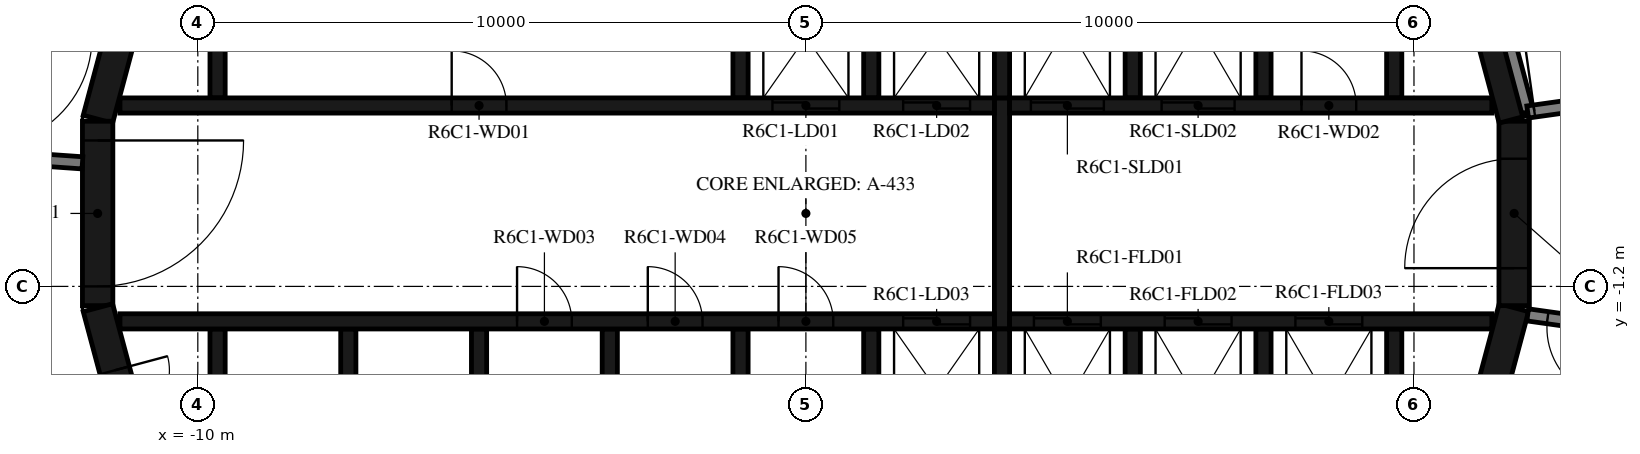
"""IFC4 building model, lengths in metres.
Left out: names, types, materials, properties, quantities, classifications, styles, units other than length and angle.
Written with IfcOpenShell. Run it as: python <this file> out.ifc"""

import sys

from ifc_helpers import new_model, si_unit, direction, frame, frame_2d, origin, place, context, subcontext, project, spatial, polyline, rectangle, outline, extrude, element, fill, save


model = new_model("IFC4")
c1 = context("Model", 3, precision=1e-05, world=origin(), true_north=direction((0.0, 1.0)))
c2 = subcontext(c1, "Body", "Model", "MODEL_VIEW")
j1 = project(units=[si_unit("LENGTHUNIT", "METRE"), si_unit("PLANEANGLEUNIT", "RADIAN")], contexts=[c1])
p1 = place(None, origin())
s1 = spatial("IfcSite", under=j1, at=p1, CompositionType="ELEMENT")
p2 = place(p1, origin())
s2 = spatial("IfcBuilding", under=s1, at=p2, CompositionType="ELEMENT")
p3 = place(p2, frame((0.0, 0.0, 251.2)))
s3 = spatial("IfcBuildingStorey", under=s2, at=p3, CompositionType="ELEMENT", Elevation=251.2)
p4 = place(p3, frame((10.858, -4.479, 0.0), z_axis=(0.0, 0.0, 1.0), x_axis=(0.258734743916, 0.965948410781, 0.0)))
e1 = element("IfcWall", 1, at=p4, inside=s3, PredefinedType="SHEAR", context=c2, shape_type="SweptSolid", body=[
    extrude(rectangle(XDim=3.033, YDim=0.5, at=frame_2d((1.516, 0.0))), origin(), (0.0, 0.0, 1.0), 3.12),
])
p5 = place(p3, frame((11.647, -1.516, 0.0), z_axis=(0.0, 0.0, 1.0), x_axis=(0.0, 1.0, 0.0)))
e2 = element("IfcWall", 2, at=p5, inside=s3, PredefinedType="SHEAR", context=c2, shape_type="SweptSolid", body=[
    extrude(rectangle(XDim=3.033, YDim=0.5, at=frame_2d((1.516, 0.0))), origin(), (0.0, 0.0, 1.0), 3.12),
])
p6 = place(p5, frame((0.616, 0.0, 0.0)))
e3 = element("IfcOpeningElement", 3, at=p6, cuts=e2, PredefinedType="OPENING", context=c2, shape_type="SweptSolid", body=[
    extrude(rectangle(XDim=1.8, YDim=2.1, at=frame_2d((0.9, 1.05))), frame((0.0, 0.26, 0.0), z_axis=(0.0, -1.0, 0.0), x_axis=(1.0, 0.0, 0.0)), (0.0, 0.0, 1.0), 0.52),
])
for number, where, z_axis, x_axis in (
    (4, (11.643, 1.55, 0.0), (0.0, 0.0, 1.0), (-0.259, 0.966, 0.0)),
    (5, (-10.858, 4.479, 0.0), (0.0, 0.0, 1.0), (-0.259, -0.966, 0.0)),
):
    element("IfcWall", number, at=place(p3, frame(where, z_axis=z_axis, x_axis=x_axis)), inside=s3, PredefinedType="SHEAR", context=c2, shape_type="SweptSolid", body=[
        extrude(rectangle(XDim=3.033, YDim=0.5, at=frame_2d((1.516, 0.0))), origin(), (0.0, 0.0, 1.0), 3.12),
    ])
p7 = place(p3, frame((-11.647, 1.516, 0.0), z_axis=(0.0, 0.0, 1.0), x_axis=(0.0, -1.0, 0.0)))
e6 = element("IfcWall", 6, at=p7, inside=s3, PredefinedType="SHEAR", context=c2, shape_type="SweptSolid", body=[
    extrude(rectangle(XDim=3.033, YDim=0.5, at=frame_2d((1.516, 0.0))), origin(), (0.0, 0.0, 1.0), 3.12),
])
p8 = place(p7, frame((0.316, 0.0, 0.0)))
e7 = element("IfcOpeningElement", 7, at=p8, cuts=e6, PredefinedType="OPENING", context=c2, shape_type="SweptSolid", body=[
    extrude(rectangle(XDim=2.4, YDim=2.1, at=frame_2d((1.2, 1.05))), frame((0.0, 0.26, 0.0), z_axis=(0.0, -1.0, 0.0), x_axis=(1.0, 0.0, 0.0)), (0.0, 0.0, 1.0), 0.52),
])
p9 = place(p3, frame((-11.643, -1.55, 0.0), z_axis=(0.0, 0.0, 1.0), x_axis=(0.258734743916, -0.965948410781, 0.0)))
e8 = element("IfcWall", 8, at=p9, inside=s3, PredefinedType="SHEAR", context=c2, shape_type="SweptSolid", body=[
    extrude(rectangle(XDim=3.033, YDim=0.5, at=frame_2d((1.516, 0.0))), origin(), (0.0, 0.0, 1.0), 3.12),
])
p10 = place(p9, frame((1.066, 0.0, 0.0)))
e9 = element("IfcOpeningElement", 9, at=p10, cuts=e8, PredefinedType="OPENING", context=c2, shape_type="SweptSolid", body=[
    extrude(rectangle(XDim=0.9, YDim=2.1, at=frame_2d((0.45, 1.05))), frame((0.0, 0.26, 0.0), z_axis=(0.0, -1.0, 0.0), x_axis=(1.0, 0.0, 0.0)), (0.0, 0.0, 1.0), 0.52),
])
p11 = place(p3, origin())
e10 = element("IfcWall", 10, at=p11, inside=s3, PredefinedType="SHEAR", context=c2, shape_type="SweptSolid", body=[
    extrude(outline(polyline([(-9.55, 4.8), (-1.2, 4.8), (-1.2, 1.9), (-0.95, 1.9), (-0.95, 4.8), (0.95, 4.8), (0.95, 1.9), (1.2, 1.9), (1.2, 4.8), (3.1, 4.8), (3.1, 1.9), (3.35, 1.9), (3.35, 4.8), (5.25, 4.8), (5.25, 1.9), (5.5, 1.9), (5.5, 4.8), (7.4, 4.8), (7.4, 1.9), (7.65, 1.9), (7.65, 4.8), (9.55, 4.8), (9.55, 1.9), (9.8, 1.9), (9.8, 4.8), (9.8, 5.05), (-9.8, 5.05), (-9.8, 4.8), (-9.8, 1.9), (-9.55, 1.9), (-9.55, 4.8)])), origin(), (0.0, 0.0, 1.0), 3.12),
])
p12 = place(p3, origin())
e11 = element("IfcWall", 11, at=p12, inside=s3, PredefinedType="SHEAR", context=c2, shape_type="SweptSolid", body=[
    extrude(outline(polyline([(9.8, -5.05), (9.8, -4.8), (9.8, -1.9), (9.55, -1.9), (9.55, -4.8), (7.65, -4.8), (7.65, -1.9), (7.4, -1.9), (7.4, -4.8), (5.5, -4.8), (5.5, -1.9), (5.25, -1.9), (5.25, -4.8), (3.35, -4.8), (3.35, -1.9), (3.1, -1.9), (3.1, -4.8), (1.2, -4.8), (1.2, -1.9), (0.95, -1.9), (0.95, -4.8), (-0.95, -4.8), (-0.95, -1.9), (-1.2, -1.9), (-1.2, -4.8), (-3.1, -4.8), (-3.1, -1.9), (-3.35, -1.9), (-3.35, -4.8), (-5.25, -4.8), (-5.25, -1.9), (-5.5, -1.9), (-5.5, -4.8), (-7.4, -4.8), (-7.4, -1.9), (-7.65, -1.9), (-7.65, -4.8), (-9.55, -4.8), (-9.55, -1.9), (-9.8, -1.9), (-9.8, -4.8), (-9.8, -5.05), (9.8, -5.05)])), origin(), (0.0, 0.0, 1.0), 3.12),
])
p13 = place(p3, frame((-11.28, 1.775, 0.0), z_axis=(0.0, 0.0, 1.0), x_axis=(1.0, 0.0, 0.0)))
e12 = element("IfcWall", 12, at=p13, inside=s3, PredefinedType="SHEAR", context=c2, shape_type="SweptSolid", body=[
    extrude(rectangle(XDim=14.38, YDim=0.25, at=frame_2d((7.19, 0.0))), origin(), (0.0, 0.0, 1.0), 3.12),
])
p14 = place(p13, frame((10.73, 0.0, 0.0)))
e13 = element("IfcOpeningElement", 13, at=p14, cuts=e12, PredefinedType="OPENING", context=c2, shape_type="SweptSolid", body=[
    extrude(rectangle(XDim=1.1, YDim=2.1, at=frame_2d((0.55, 1.05))), frame((0.0, 0.135, 0.0), z_axis=(0.0, -1.0, 0.0), x_axis=(1.0, 0.0, 0.0)), (0.0, 0.0, 1.0), 0.27),
])
p15 = place(p13, frame((12.88, 0.0, 0.0)))
e14 = element("IfcOpeningElement", 14, at=p15, cuts=e12, PredefinedType="OPENING", context=c2, shape_type="SweptSolid", body=[
    extrude(rectangle(XDim=1.1, YDim=2.1, at=frame_2d((0.55, 1.05))), frame((0.0, 0.135, 0.0), z_axis=(0.0, -1.0, 0.0), x_axis=(1.0, 0.0, 0.0)), (0.0, 0.0, 1.0), 0.27),
])
p16 = place(p13, frame((5.455, 0.0, 0.0)))
e15 = element("IfcOpeningElement", 15, at=p16, cuts=e12, PredefinedType="OPENING", context=c2, shape_type="SweptSolid", body=[
    extrude(rectangle(XDim=0.9, YDim=2.1, at=frame_2d((0.45, 1.05))), frame((0.0, 0.135, 0.0), z_axis=(0.0, -1.0, 0.0), x_axis=(1.0, 0.0, 0.0)), (0.0, 0.0, 1.0), 0.27),
])
p17 = place(p3, frame((3.35, 1.775, 0.0), z_axis=(0.0, 0.0, 1.0), x_axis=(1.0, 0.0, 0.0)))
e16 = element("IfcWall", 16, at=p17, inside=s3, PredefinedType="SHEAR", context=c2, shape_type="SweptSolid", body=[
    extrude(rectangle(XDim=7.93, YDim=0.25, at=frame_2d((3.965, 0.0))), origin(), (0.0, 0.0, 1.0), 3.12),
])
p18 = place(p17, frame((0.35, 0.0, 0.0)))
e17 = element("IfcOpeningElement", 17, at=p18, cuts=e16, PredefinedType="OPENING", context=c2, shape_type="SweptSolid", body=[
    extrude(rectangle(XDim=1.2, YDim=2.4, at=frame_2d((0.6, 1.2))), frame((0.0, 0.135, 0.0), z_axis=(0.0, -1.0, 0.0), x_axis=(1.0, 0.0, 0.0)), (0.0, 0.0, 1.0), 0.27),
])
p19 = place(p17, frame((2.5, 0.0, 0.0)))
e18 = element("IfcOpeningElement", 18, at=p19, cuts=e16, PredefinedType="OPENING", context=c2, shape_type="SweptSolid", body=[
    extrude(rectangle(XDim=1.2, YDim=2.4, at=frame_2d((0.6, 1.2))), frame((0.0, 0.135, 0.0), z_axis=(0.0, -1.0, 0.0), x_axis=(1.0, 0.0, 0.0)), (0.0, 0.0, 1.0), 0.27),
])
p20 = place(p17, frame((4.8, 0.0, 0.0)))
e19 = element("IfcOpeningElement", 19, at=p20, cuts=e16, PredefinedType="OPENING", context=c2, shape_type="SweptSolid", body=[
    extrude(rectangle(XDim=0.9, YDim=2.1, at=frame_2d((0.45, 1.05))), frame((0.0, 0.135, 0.0), z_axis=(0.0, -1.0, 0.0), x_axis=(1.0, 0.0, 0.0)), (0.0, 0.0, 1.0), 0.27),
])
p21 = place(p3, frame((-11.28, -1.775, 0.0), z_axis=(0.0, 0.0, 1.0), x_axis=(1.0, 0.0, 0.0)))
e20 = element("IfcWall", 20, at=p21, inside=s3, PredefinedType="SHEAR", context=c2, shape_type="SweptSolid", body=[
    extrude(rectangle(XDim=14.38, YDim=0.25, at=frame_2d((7.19, 0.0))), origin(), (0.0, 0.0, 1.0), 3.12),
])
p22 = place(p21, frame((12.88, 0.0, 0.0)))
e21 = element("IfcOpeningElement", 21, at=p22, cuts=e20, PredefinedType="OPENING", context=c2, shape_type="SweptSolid", body=[
    extrude(rectangle(XDim=1.1, YDim=2.1, at=frame_2d((0.55, 1.05))), frame((0.0, 0.135, 0.0), z_axis=(0.0, -1.0, 0.0), x_axis=(1.0, 0.0, 0.0)), (0.0, 0.0, 1.0), 0.27),
])
p23 = place(p21, frame((6.53, 0.0, 0.0)))
e22 = element("IfcOpeningElement", 22, at=p23, cuts=e20, PredefinedType="OPENING", context=c2, shape_type="SweptSolid", body=[
    extrude(rectangle(XDim=0.9, YDim=2.1, at=frame_2d((0.45, 1.05))), frame((0.0, 0.135, 0.0), z_axis=(0.0, -1.0, 0.0), x_axis=(1.0, 0.0, 0.0)), (0.0, 0.0, 1.0), 0.27),
])
p24 = place(p21, frame((8.68, 0.0, 0.0)))
e23 = element("IfcOpeningElement", 23, at=p24, cuts=e20, PredefinedType="OPENING", context=c2, shape_type="SweptSolid", body=[
    extrude(rectangle(XDim=0.9, YDim=2.1, at=frame_2d((0.45, 1.05))), frame((0.0, 0.135, 0.0), z_axis=(0.0, -1.0, 0.0), x_axis=(1.0, 0.0, 0.0)), (0.0, 0.0, 1.0), 0.27),
])
p25 = place(p21, frame((10.83, 0.0, 0.0)))
e24 = element("IfcOpeningElement", 24, at=p25, cuts=e20, PredefinedType="OPENING", context=c2, shape_type="SweptSolid", body=[
    extrude(rectangle(XDim=0.9, YDim=2.1, at=frame_2d((0.45, 1.05))), frame((0.0, 0.135, 0.0), z_axis=(0.0, -1.0, 0.0), x_axis=(1.0, 0.0, 0.0)), (0.0, 0.0, 1.0), 0.27),
])
p26 = place(p3, frame((3.35, -1.775, 0.0), z_axis=(0.0, 0.0, 1.0), x_axis=(1.0, 0.0, 0.0)))
e25 = element("IfcWall", 25, at=p26, inside=s3, PredefinedType="SHEAR", context=c2, shape_type="SweptSolid", body=[
    extrude(rectangle(XDim=7.93, YDim=0.25, at=frame_2d((3.965, 0.0))), origin(), (0.0, 0.0, 1.0), 3.12),
])
p27 = place(p26, frame((0.4, 0.0, 0.0)))
e26 = element("IfcOpeningElement", 26, at=p27, cuts=e25, PredefinedType="OPENING", context=c2, shape_type="SweptSolid", body=[
    extrude(rectangle(XDim=1.1, YDim=2.4, at=frame_2d((0.55, 1.2))), frame((0.0, 0.135, 0.0), z_axis=(0.0, -1.0, 0.0), x_axis=(1.0, 0.0, 0.0)), (0.0, 0.0, 1.0), 0.27),
])
p28 = place(p26, frame((2.55, 0.0, 0.0)))
e27 = element("IfcOpeningElement", 27, at=p28, cuts=e25, PredefinedType="OPENING", context=c2, shape_type="SweptSolid", body=[
    extrude(rectangle(XDim=1.1, YDim=2.4, at=frame_2d((0.55, 1.2))), frame((0.0, 0.135, 0.0), z_axis=(0.0, -1.0, 0.0), x_axis=(1.0, 0.0, 0.0)), (0.0, 0.0, 1.0), 0.27),
])
p29 = place(p26, frame((4.7, 0.0, 0.0)))
e28 = element("IfcOpeningElement", 28, at=p29, cuts=e25, PredefinedType="OPENING", context=c2, shape_type="SweptSolid", body=[
    extrude(rectangle(XDim=1.1, YDim=2.4, at=frame_2d((0.55, 1.2))), frame((0.0, 0.135, 0.0), z_axis=(0.0, -1.0, 0.0), x_axis=(1.0, 0.0, 0.0)), (0.0, 0.0, 1.0), 0.27),
])
p30 = place(p3, frame((3.225, -1.9, 0.0), z_axis=(0.0, 0.0, 1.0), x_axis=(0.0, 1.0, 0.0)))
e29 = element("IfcWall", 29, at=p30, inside=s3, PredefinedType="SHEAR", context=c2, shape_type="SweptSolid", body=[
    extrude(rectangle(XDim=3.8, YDim=0.25, at=frame_2d((1.9, 0.0))), origin(), (0.0, 0.0, 1.0), 3.12),
])
p31 = place(p3, frame((11.87, 1.668, 0.0), z_axis=(0.0, 0.0, 1.0), x_axis=(-0.258836880648, 0.965921047093, 0.0)))
e30 = element("IfcWall", 30, at=p31, inside=s3, PredefinedType="STANDARD", context=c2, shape_type="SweptSolid", body=[
    extrude(rectangle(XDim=1.695, YDim=0.2, at=frame_2d((0.848, 0.0))), origin(), (0.0, 0.0, 1.0), 3.12),
])
p32 = place(p3, frame((11.87, 1.668, 0.0), z_axis=(0.0, 0.0, 1.0), x_axis=(0.990267985606, 0.139173692496, 0.0)))
e31 = element("IfcWall", 31, at=p32, inside=s3, PredefinedType="STANDARD", context=c2, shape_type="SweptSolid", body=[
    extrude(rectangle(XDim=1.475, YDim=0.2, at=frame_2d((0.738, 0.0))), origin(), (0.0, 0.0, 1.0), 3.12),
])
p33 = place(p32, frame((0.11, 0.0, 0.0)))
e32 = element("IfcOpeningElement", 32, at=p33, cuts=e31, PredefinedType="OPENING", context=c2, shape_type="SweptSolid", body=[
    extrude(rectangle(XDim=1.2, YDim=2.1, at=frame_2d((0.6, 1.05))), frame((0.0, 0.11, 0.0), z_axis=(0.0, -1.0, 0.0), x_axis=(1.0, 0.0, 0.0)), (0.0, 0.0, 1.0), 0.22),
])
p34 = place(p3, frame((-13.454, 0.941, 0.0), z_axis=(0.0, 0.0, 1.0), x_axis=(0.99755155062, -0.069934997354, 0.0)))
e33 = element("IfcWall", 33, at=p34, inside=s3, PredefinedType="STANDARD", context=c2, shape_type="SweptSolid", body=[
    extrude(rectangle(XDim=1.561, YDim=0.2, at=frame_2d((0.78, 0.0))), origin(), (0.0, 0.0, 1.0), 3.12),
])
p35 = place(p3, frame((13.496, -1.897, 0.0), z_axis=(0.0, 0.0, 1.0), x_axis=(-0.99026234641, 0.139213811391, 0.0)))
e34 = element("IfcWall", 34, at=p35, inside=s3, PredefinedType="STANDARD", context=c2, shape_type="SweptSolid", body=[
    extrude(rectangle(XDim=1.641, YDim=0.2, at=frame_2d((0.821, 0.0))), origin(), (0.0, 0.0, 1.0), 3.12),
])
p36 = place(p35, frame((0.11, 0.0, 0.0)))
e35 = element("IfcOpeningElement", 35, at=p36, cuts=e34, PredefinedType="OPENING", context=c2, shape_type="SweptSolid", body=[
    extrude(rectangle(XDim=1.2, YDim=2.1, at=frame_2d((0.6, 1.05))), frame((0.0, 0.11, 0.0), z_axis=(0.0, -1.0, 0.0), x_axis=(1.0, 0.0, 0.0)), (0.0, 0.0, 1.0), 0.22),
])
p37 = place(p8, origin())
e36 = element("IfcDoor", 36, at=p37, inside=s3, OperationType="DOUBLE_DOOR_SINGLE_SWING", PredefinedType="DOOR", context=c2, shape_type="SweptSolid", body=[
    extrude(rectangle(XDim=2.4, YDim=2.1, at=frame_2d((1.2, 1.05))), frame((0.0, 0.025, 0.0), z_axis=(0.0, -1.0, 0.0), x_axis=(1.0, 0.0, 0.0)), (0.0, 0.0, 1.0), 0.05),
])
fill(e7, e36)
p38 = place(p6, origin())
e37 = element("IfcDoor", 37, at=p38, inside=s3, OperationType="DOUBLE_DOOR_SINGLE_SWING", PredefinedType="DOOR", context=c2, shape_type="SweptSolid", body=[
    extrude(rectangle(XDim=1.8, YDim=2.1, at=frame_2d((0.9, 1.05))), frame((0.0, 0.025, 0.0), z_axis=(0.0, -1.0, 0.0), x_axis=(1.0, 0.0, 0.0)), (0.0, 0.0, 1.0), 0.05),
])
fill(e3, e37)
p39 = place(p14, origin())
e38 = element("IfcDoor", 38, at=p39, inside=s3, OperationType="DOUBLE_DOOR_SLIDING", PredefinedType="DOOR", context=c2, shape_type="SweptSolid", body=[
    extrude(rectangle(XDim=1.1, YDim=2.1, at=frame_2d((0.55, 1.05))), frame((0.0, 0.025, 0.0), z_axis=(0.0, -1.0, 0.0), x_axis=(1.0, 0.0, 0.0)), (0.0, 0.0, 1.0), 0.05),
])
fill(e13, e38)
p40 = place(p15, origin())
e39 = element("IfcDoor", 39, at=p40, inside=s3, OperationType="DOUBLE_DOOR_SLIDING", PredefinedType="DOOR", context=c2, shape_type="SweptSolid", body=[
    extrude(rectangle(XDim=1.1, YDim=2.1, at=frame_2d((0.55, 1.05))), frame((0.0, 0.025, 0.0), z_axis=(0.0, -1.0, 0.0), x_axis=(1.0, 0.0, 0.0)), (0.0, 0.0, 1.0), 0.05),
])
fill(e14, e39)
p41 = place(p18, origin())
e40 = element("IfcDoor", 40, at=p41, inside=s3, OperationType="DOUBLE_DOOR_SLIDING", PredefinedType="DOOR", context=c2, shape_type="SweptSolid", body=[
    extrude(rectangle(XDim=1.2, YDim=2.4, at=frame_2d((0.6, 1.2))), frame((0.0, 0.025, 0.0), z_axis=(0.0, -1.0, 0.0), x_axis=(1.0, 0.0, 0.0)), (0.0, 0.0, 1.0), 0.05),
])
fill(e17, e40)
p42 = place(p19, origin())
e41 = element("IfcDoor", 41, at=p42, inside=s3, OperationType="DOUBLE_DOOR_SLIDING", PredefinedType="DOOR", context=c2, shape_type="SweptSolid", body=[
    extrude(rectangle(XDim=1.2, YDim=2.4, at=frame_2d((0.6, 1.2))), frame((0.0, 0.025, 0.0), z_axis=(0.0, -1.0, 0.0), x_axis=(1.0, 0.0, 0.0)), (0.0, 0.0, 1.0), 0.05),
])
fill(e18, e41)
p43 = place(p22, origin())
e42 = element("IfcDoor", 42, at=p43, inside=s3, OperationType="DOUBLE_DOOR_SLIDING", PredefinedType="DOOR", context=c2, shape_type="SweptSolid", body=[
    extrude(rectangle(XDim=1.1, YDim=2.1, at=frame_2d((0.55, 1.05))), frame((0.0, 0.025, 0.0), z_axis=(0.0, -1.0, 0.0), x_axis=(1.0, 0.0, 0.0)), (0.0, 0.0, 1.0), 0.05),
])
fill(e21, e42)
p44 = place(p27, origin())
e43 = element("IfcDoor", 43, at=p44, inside=s3, OperationType="DOUBLE_DOOR_SLIDING", PredefinedType="DOOR", context=c2, shape_type="SweptSolid", body=[
    extrude(rectangle(XDim=1.1, YDim=2.4, at=frame_2d((0.55, 1.2))), frame((0.0, 0.025, 0.0), z_axis=(0.0, -1.0, 0.0), x_axis=(1.0, 0.0, 0.0)), (0.0, 0.0, 1.0), 0.05),
])
fill(e26, e43)
p45 = place(p28, origin())
e44 = element("IfcDoor", 44, at=p45, inside=s3, OperationType="DOUBLE_DOOR_SLIDING", PredefinedType="DOOR", context=c2, shape_type="SweptSolid", body=[
    extrude(rectangle(XDim=1.1, YDim=2.4, at=frame_2d((0.55, 1.2))), frame((0.0, 0.025, 0.0), z_axis=(0.0, -1.0, 0.0), x_axis=(1.0, 0.0, 0.0)), (0.0, 0.0, 1.0), 0.05),
])
fill(e27, e44)
p46 = place(p29, origin())
e45 = element("IfcDoor", 45, at=p46, inside=s3, OperationType="DOUBLE_DOOR_SLIDING", PredefinedType="DOOR", context=c2, shape_type="SweptSolid", body=[
    extrude(rectangle(XDim=1.1, YDim=2.4, at=frame_2d((0.55, 1.2))), frame((0.0, 0.025, 0.0), z_axis=(0.0, -1.0, 0.0), x_axis=(1.0, 0.0, 0.0)), (0.0, 0.0, 1.0), 0.05),
])
fill(e28, e45)
p47 = place(p16, origin())
e46 = element("IfcDoor", 46, at=p47, inside=s3, OperationType="SINGLE_SWING_LEFT", PredefinedType="DOOR", context=c2, shape_type="SweptSolid", body=[
    extrude(rectangle(XDim=0.9, YDim=2.1, at=frame_2d((0.45, 1.05))), frame((0.0, 0.025, 0.0), z_axis=(0.0, -1.0, 0.0), x_axis=(1.0, 0.0, 0.0)), (0.0, 0.0, 1.0), 0.05),
])
fill(e15, e46)
p48 = place(p20, origin())
e47 = element("IfcDoor", 47, at=p48, inside=s3, OperationType="SINGLE_SWING_RIGHT", PredefinedType="DOOR", context=c2, shape_type="SweptSolid", body=[
    extrude(rectangle(XDim=0.9, YDim=2.1, at=frame_2d((0.45, 1.05))), frame((0.0, 0.025, 0.0), z_axis=(0.0, -1.0, 0.0), x_axis=(1.0, 0.0, 0.0)), (0.0, 0.0, 1.0), 0.05),
])
fill(e19, e47)
p49 = place(p23, origin())
e48 = element("IfcDoor", 48, at=p49, inside=s3, OperationType="SINGLE_SWING_LEFT", PredefinedType="DOOR", context=c2, shape_type="SweptSolid", body=[
    extrude(rectangle(XDim=0.9, YDim=2.1, at=frame_2d((0.45, 1.05))), frame((0.0, 0.025, 0.0), z_axis=(0.0, -1.0, 0.0), x_axis=(1.0, 0.0, 0.0)), (0.0, 0.0, 1.0), 0.05),
])
fill(e22, e48)
p50 = place(p24, origin())
e49 = element("IfcDoor", 49, at=p50, inside=s3, OperationType="SINGLE_SWING_RIGHT", PredefinedType="DOOR", context=c2, shape_type="SweptSolid", body=[
    extrude(rectangle(XDim=0.9, YDim=2.1, at=frame_2d((0.45, 1.05))), frame((0.0, 0.025, 0.0), z_axis=(0.0, -1.0, 0.0), x_axis=(1.0, 0.0, 0.0)), (0.0, 0.0, 1.0), 0.05),
])
fill(e23, e49)
p51 = place(p25, origin())
e50 = element("IfcDoor", 50, at=p51, inside=s3, OperationType="SINGLE_SWING_LEFT", PredefinedType="DOOR", context=c2, shape_type="SweptSolid", body=[
    extrude(rectangle(XDim=0.9, YDim=2.1, at=frame_2d((0.45, 1.05))), frame((0.0, 0.025, 0.0), z_axis=(0.0, -1.0, 0.0), x_axis=(1.0, 0.0, 0.0)), (0.0, 0.0, 1.0), 0.05),
])
fill(e24, e50)
p52 = place(p10, origin())
e51 = element("IfcDoor", 51, at=p52, inside=s3, OperationType="SINGLE_SWING_RIGHT", PredefinedType="DOOR", context=c2, shape_type="SweptSolid", body=[
    extrude(rectangle(XDim=0.9, YDim=2.1, at=frame_2d((0.45, 1.05))), frame((0.0, 0.025, 0.0), z_axis=(0.0, -1.0, 0.0), x_axis=(1.0, 0.0, 0.0)), (0.0, 0.0, 1.0), 0.05),
])
fill(e9, e51)
p53 = place(p33, origin())
e52 = element("IfcDoor", 52, at=p53, inside=s3, OperationType="DOUBLE_DOOR_SINGLE_SWING", PredefinedType="DOOR", context=c2, shape_type="SweptSolid", body=[
    extrude(rectangle(XDim=1.2, YDim=2.1, at=frame_2d((0.6, 1.05))), frame((0.0, 0.025, 0.0), z_axis=(0.0, -1.0, 0.0), x_axis=(1.0, 0.0, 0.0)), (0.0, 0.0, 1.0), 0.05),
])
fill(e32, e52)
p54 = place(p36, origin())
e53 = element("IfcDoor", 53, at=p54, inside=s3, OperationType="DOUBLE_DOOR_SINGLE_SWING", PredefinedType="DOOR", context=c2, shape_type="SweptSolid", body=[
    extrude(rectangle(XDim=1.2, YDim=2.1, at=frame_2d((0.6, 1.05))), frame((0.0, 0.025, 0.0), z_axis=(0.0, -1.0, 0.0), x_axis=(1.0, 0.0, 0.0)), (0.0, 0.0, 1.0), 0.05),
])
fill(e35, e53)
save(model, sys.argv[1])
